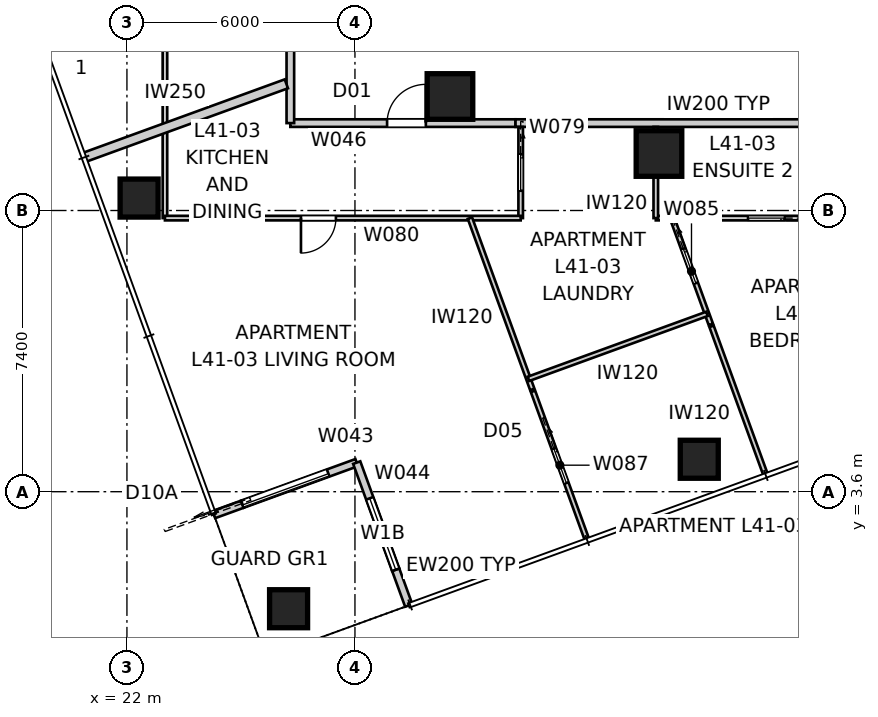
"""IFC4 building model, lengths in metres.
Left out: names, types, materials, properties, quantities, classifications, styles, units other than length and angle.
Written with IfcOpenShell. Run it as: python <this file> out.ifc"""

import sys

from ifc_helpers import new_model, si_unit, direction, frame, frame_2d, origin, origin_2d, place, context, subcontext, project, spatial, rectangle, extrude, element, fill, save


model = new_model("IFC4")
c1 = context("Model", 3, precision=1e-05, world=origin(), true_north=direction((0.0, 1.0)))
c2 = subcontext(c1, "Body", "Model", "MODEL_VIEW")
j1 = project(units=[si_unit("LENGTHUNIT", "METRE"), si_unit("PLANEANGLEUNIT", "RADIAN")], contexts=[c1])
p1 = place(None, origin())
s1 = spatial("IfcSite", under=j1, at=p1, CompositionType="ELEMENT")
p2 = place(p1, origin())
s2 = spatial("IfcBuilding", under=s1, at=p2, CompositionType="ELEMENT")
p3 = place(p2, frame((0.0, 0.0, 150.6)))
s3 = spatial("IfcBuildingStorey", under=s2, at=p3, CompositionType="ELEMENT", Elevation=150.6)
for number, where, z_axis, x_axis in (
    (1, (26.253, 0.521, 0.0), (0.0, 0.0, 1.0), (1.0, 0.0, 0.0)),
    (2, (37.06, 4.454, 0.0), (0.0, 0.0, 1.0), (1.0, 0.0, 0.0)),
    (3, (22.32, 11.327, 0.0), (0.0, 0.0, 1.0), (1.0, 0.0, 0.0)),
):
    element("IfcColumn", number, at=place(p3, frame(where, z_axis=z_axis, x_axis=x_axis)), inside=s3, PredefinedType="COLUMN", context=c2, shape_type="SweptSolid", body=[
        extrude(rectangle(XDim=1.0, YDim=1.0, at=origin_2d()), origin(), (0.0, 0.0, 1.0), 3.4),
    ])
for number, where, z_axis, x_axis in (
    (4, (30.5, 14.0, 0.0), (0.0, 0.0, 1.0), (1.0, 0.0, 0.0)),
    (5, (36.0, 12.5, 0.0), (0.0, 0.0, 1.0), (1.0, 0.0, 0.0)),
):
    element("IfcColumn", number, at=place(p3, frame(where, z_axis=z_axis, x_axis=x_axis)), inside=s3, PredefinedType="COLUMN", context=c2, shape_type="SweptSolid", body=[
        extrude(rectangle(XDim=1.2, YDim=1.2, at=origin_2d()), origin(), (0.0, 0.0, 1.0), 3.4),
    ])
p4 = place(p3, frame((24.288, 2.998, 0.0), z_axis=(0.0, 0.0, 1.0), x_axis=(0.939659694648, 0.342110593602, 0.0)))
e6 = element("IfcWall", 6, at=p4, inside=s3, PredefinedType="SOLIDWALL", context=c2, shape_type="SweptSolid", body=[
    extrude(rectangle(XDim=0.8, YDim=0.2, at=frame_2d((0.4, 0.0))), origin(), (0.0, 0.0, 1.0), 3.25),
])
p5 = place(p3, frame((25.04, 3.271, 0.0), z_axis=(0.0, 0.0, 1.0), x_axis=(0.939693144909, 0.342018703306, 0.0)))
e7 = element("IfcWall", 7, at=p5, inside=s3, PredefinedType="SOLIDWALL", context=c2, shape_type="SweptSolid", body=[
    extrude(rectangle(XDim=3.2, YDim=0.2, at=frame_2d((1.6, 0.0))), origin(), (0.0, 0.0, 1.0), 2.722),
])
p6 = place(p5, origin())
e8 = element("IfcOpeningElement", 8, at=p6, cuts=e7, PredefinedType="OPENING", context=c2, shape_type="SweptSolid", body=[
    extrude(rectangle(XDim=2.4, YDim=2.1, at=frame_2d((1.2, 1.05))), frame((0.0, 0.11, 0.0), z_axis=(0.0, -1.0, 0.0), x_axis=(1.0, 0.0, 0.0)), (0.0, 0.0, 1.0), 0.22),
])
p7 = place(p3, frame((28.047, 4.366, 0.0), z_axis=(0.0, 0.0, 1.0), x_axis=(0.341965219194, -0.939712609717, 0.0)))
e9 = element("IfcWall", 9, at=p7, inside=s3, PredefinedType="SOLIDWALL", context=c2, shape_type="SweptSolid", body=[
    extrude(rectangle(XDim=3.0, YDim=0.2, at=frame_2d((1.5, 0.0))), origin(), (0.0, 0.0, 1.0), 2.722),
])
p8 = place(p7, frame((1.0, 0.0, 0.45)))
e10 = element("IfcOpeningElement", 10, at=p8, cuts=e9, PredefinedType="OPENING", context=c2, shape_type="SweptSolid", body=[
    extrude(rectangle(XDim=2.0, YDim=1.8, at=frame_2d((1.0, 0.9))), frame((0.0, 0.11, 0.0), z_axis=(0.0, -1.0, 0.0), x_axis=(1.0, 0.0, 0.0)), (0.0, 0.0, 1.0), 0.22),
])
p9 = place(p3, frame((29.073, 1.547, 0.0), z_axis=(0.0, 0.0, 1.0), x_axis=(0.342037080957, -0.939686455819, 0.0)))
e11 = element("IfcWall", 11, at=p9, inside=s3, PredefinedType="SOLIDWALL", context=c2, shape_type="SweptSolid", body=[
    extrude(rectangle(XDim=1.0, YDim=0.2, at=frame_2d((0.5, 0.0))), origin(), (0.0, 0.0, 1.0), 3.25),
])
p10 = place(p3, frame((26.3, 13.3, 0.0), z_axis=(0.0, 0.0, 1.0), x_axis=(1.0, 0.0, 0.0)))
e12 = element("IfcWall", 12, at=p10, inside=s3, PredefinedType="PARTITIONING", context=c2, shape_type="SweptSolid", body=[
    extrude(rectangle(XDim=5.925, YDim=0.2, at=frame_2d((2.962, 0.0))), origin(), (0.0, 0.0, 1.0), 3.25),
])
p11 = place(p10, frame((2.545, 0.0, 0.0)))
e13 = element("IfcOpeningElement", 13, at=p11, cuts=e12, PredefinedType="OPENING", context=c2, shape_type="SweptSolid", body=[
    extrude(rectangle(XDim=1.02, YDim=2.34, at=frame_2d((0.51, 1.17))), frame((0.0, 0.11, 0.0), z_axis=(0.0, -1.0, 0.0), x_axis=(1.0, 0.0, 0.0)), (0.0, 0.0, 1.0), 0.22),
])
p12 = place(p3, frame((32.225, 13.3, 0.0), z_axis=(0.0, 0.0, 1.0), x_axis=(1.0, 0.0, 0.0)))
e14 = element("IfcWall", 14, at=p12, inside=s3, PredefinedType="PARTITIONING", context=c2, shape_type="SweptSolid", body=[
    extrude(rectangle(XDim=1.684, YDim=0.2, at=frame_2d((0.842, 0.0))), origin(), (0.0, 0.0, 1.0), 2.55),
])
p13 = place(p3, frame((33.908, 13.3, 0.0), z_axis=(0.0, 0.0, 1.0), x_axis=(1.0, 0.0, 0.0)))
e15 = element("IfcWall", 15, at=p13, inside=s3, PredefinedType="PARTITIONING", context=c2, shape_type="SweptSolid", body=[
    extrude(rectangle(XDim=12.183, YDim=0.2, at=frame_2d((6.092, 0.0))), origin(), (0.0, 0.0, 1.0), 3.25),
])
p14 = place(p3, frame((26.3, 46.3, 0.0), z_axis=(0.0, 0.0, 1.0), x_axis=(0.0, -1.0, 0.0)))
e16 = element("IfcWall", 16, at=p14, inside=s3, PredefinedType="PARTITIONING", context=c2, shape_type="SweptSolid", body=[
    extrude(rectangle(XDim=33.0, YDim=0.2, at=frame_2d((16.5, 0.0))), origin(), (0.0, 0.0, 1.0), 3.25),
])
p15 = place(p14, frame((13.229, 0.0, 0.0)))
e17 = element("IfcOpeningElement", 17, at=p15, cuts=e16, PredefinedType="OPENING", context=c2, shape_type="SweptSolid", body=[
    extrude(rectangle(XDim=1.02, YDim=2.34, at=frame_2d((0.51, 1.17))), frame((0.0, 0.11, 0.0), z_axis=(0.0, -1.0, 0.0), x_axis=(1.0, 0.0, 0.0)), (0.0, 0.0, 1.0), 0.22),
])
p16 = place(p14, frame((28.51, 0.0, 0.0)))
e18 = element("IfcOpeningElement", 18, at=p16, cuts=e16, PredefinedType="OPENING", context=c2, shape_type="SweptSolid", body=[
    extrude(rectangle(XDim=1.02, YDim=2.34, at=frame_2d((0.51, 1.17))), frame((0.0, 0.11, 0.0), z_axis=(0.0, -1.0, 0.0), x_axis=(1.0, 0.0, 0.0)), (0.0, 0.0, 1.0), 0.22),
])
p17 = place(p14, frame((1.998, 0.0, 0.0)))
e19 = element("IfcOpeningElement", 19, at=p17, cuts=e16, PredefinedType="OPENING", context=c2, shape_type="SweptSolid", body=[
    extrude(rectangle(XDim=1.02, YDim=2.34, at=frame_2d((0.51, 1.17))), frame((0.0, 0.11, 0.0), z_axis=(0.0, -1.0, 0.0), x_axis=(1.0, 0.0, 0.0)), (0.0, 0.0, 1.0), 0.22),
])
p18 = place(p3, frame((20.868, 12.395, 0.0), z_axis=(0.0, 0.0, 1.0), x_axis=(0.939690274876, 0.342026588591, 0.0)))
e20 = element("IfcWall", 20, at=p18, inside=s3, PredefinedType="PARTITIONING", context=c2, shape_type="SweptSolid", body=[
    extrude(rectangle(XDim=5.669, YDim=0.25, at=frame_2d((2.834, 0.0))), origin(), (0.0, 0.0, 1.0), 3.25),
])
p19 = place(p3, frame((23.0, 10.8, 0.0), z_axis=(0.0, 0.0, 1.0), x_axis=(0.0, 1.0, 0.0)))
e21 = element("IfcWall", 21, at=p19, inside=s3, PredefinedType="PARTITIONING", context=c2, shape_type="SweptSolid", body=[
    extrude(rectangle(XDim=38.0, YDim=0.12, at=frame_2d((19.0, 0.0))), origin(), (0.0, 0.0, 1.0), 2.55),
])
p20 = place(p19, frame((20.674, 0.0, 0.0)))
e22 = element("IfcOpeningElement", 22, at=p20, cuts=e21, PredefinedType="OPENING", context=c2, shape_type="SweptSolid", body=[
    extrude(rectangle(XDim=0.92, YDim=2.34, at=frame_2d((0.46, 1.17))), frame((0.0, 0.07, 0.0), z_axis=(0.0, -1.0, 0.0), x_axis=(1.0, 0.0, 0.0)), (0.0, 0.0, 1.0), 0.14),
])
p21 = place(p19, frame((4.598, 0.0, 0.0)))
e23 = element("IfcOpeningElement", 23, at=p21, cuts=e21, PredefinedType="OPENING", context=c2, shape_type="SweptSolid", body=[
    extrude(rectangle(XDim=0.92, YDim=2.34, at=frame_2d((0.46, 1.17))), frame((0.0, 0.07, 0.0), z_axis=(0.0, -1.0, 0.0), x_axis=(1.0, 0.0, 0.0)), (0.0, 0.0, 1.0), 0.14),
])
p22 = place(p19, frame((8.043, 0.0, 0.0)))
e24 = element("IfcOpeningElement", 24, at=p22, cuts=e21, PredefinedType="OPENING", context=c2, shape_type="SweptSolid", body=[
    extrude(rectangle(XDim=0.92, YDim=2.34, at=frame_2d((0.46, 1.17))), frame((0.0, 0.07, 0.0), z_axis=(0.0, -1.0, 0.0), x_axis=(1.0, 0.0, 0.0)), (0.0, 0.0, 1.0), 0.14),
])
p23 = place(p19, frame((33.957, 0.0, 0.0)))
e25 = element("IfcOpeningElement", 25, at=p23, cuts=e21, PredefinedType="OPENING", context=c2, shape_type="SweptSolid", body=[
    extrude(rectangle(XDim=0.92, YDim=2.34, at=frame_2d((0.46, 1.17))), frame((0.0, 0.07, 0.0), z_axis=(0.0, -1.0, 0.0), x_axis=(1.0, 0.0, 0.0)), (0.0, 0.0, 1.0), 0.14),
])
p24 = place(p19, frame((26.957, 0.0, 0.0)))
e26 = element("IfcOpeningElement", 26, at=p24, cuts=e21, PredefinedType="OPENING", context=c2, shape_type="SweptSolid", body=[
    extrude(rectangle(XDim=0.96, YDim=2.1, at=frame_2d((0.48, 1.05))), frame((0.0, 0.07, 0.0), z_axis=(0.0, -1.0, 0.0), x_axis=(1.0, 0.0, 0.0)), (0.0, 0.0, 1.0), 0.14),
])
p25 = place(p3, frame((32.361, 13.2, 0.0), z_axis=(0.0, 0.0, 1.0), x_axis=(0.0, -1.0, 0.0)))
e27 = element("IfcWall", 27, at=p25, inside=s3, PredefinedType="PARTITIONING", context=c2, shape_type="SweptSolid", body=[
    extrude(rectangle(XDim=2.4, YDim=0.12, at=frame_2d((1.2, 0.0))), origin(), (0.0, 0.0, 1.0), 3.25),
])
p26 = place(p25, frame((0.72, 0.0, 0.0)))
e28 = element("IfcOpeningElement", 28, at=p26, cuts=e27, PredefinedType="OPENING", context=c2, shape_type="SweptSolid", body=[
    extrude(rectangle(XDim=0.96, YDim=2.1, at=frame_2d((0.48, 1.05))), frame((0.0, 0.07, 0.0), z_axis=(0.0, -1.0, 0.0), x_axis=(1.0, 0.0, 0.0)), (0.0, 0.0, 1.0), 0.14),
])
p27 = place(p3, frame((32.361, 10.8, 0.0), z_axis=(0.0, 0.0, 1.0), x_axis=(-1.0, 0.0, 0.0)))
e29 = element("IfcWall", 29, at=p27, inside=s3, PredefinedType="PARTITIONING", context=c2, shape_type="SweptSolid", body=[
    extrude(rectangle(XDim=9.361, YDim=0.12, at=frame_2d((4.681, 0.0))), origin(), (0.0, 0.0, 1.0), 3.25),
])
p28 = place(p27, frame((4.862, 0.0, 0.0)))
e30 = element("IfcOpeningElement", 30, at=p28, cuts=e29, PredefinedType="OPENING", context=c2, shape_type="SweptSolid", body=[
    extrude(rectangle(XDim=0.92, YDim=2.34, at=frame_2d((0.46, 1.17))), frame((0.0, 0.07, 0.0), z_axis=(0.0, -1.0, 0.0), x_axis=(1.0, 0.0, 0.0)), (0.0, 0.0, 1.0), 0.14),
])
p29 = place(p3, frame((53.8, 10.8, 0.0), z_axis=(0.0, 0.0, 1.0), x_axis=(-1.0, 0.0, 0.0)))
e31 = element("IfcWall", 31, at=p29, inside=s3, PredefinedType="PARTITIONING", context=c2, shape_type="SweptSolid", body=[
    extrude(rectangle(XDim=17.884, YDim=0.12, at=frame_2d((8.942, 0.0))), origin(), (0.0, 0.0, 1.0), 3.25),
])
p30 = place(p29, frame((3.665, 0.0, 0.0)))
e32 = element("IfcOpeningElement", 32, at=p30, cuts=e31, PredefinedType="OPENING", context=c2, shape_type="SweptSolid", body=[
    extrude(rectangle(XDim=0.92, YDim=2.34, at=frame_2d((0.46, 1.17))), frame((0.0, 0.07, 0.0), z_axis=(0.0, -1.0, 0.0), x_axis=(1.0, 0.0, 0.0)), (0.0, 0.0, 1.0), 0.14),
])
p31 = place(p29, frame((14.497, 0.0, 0.0)))
e33 = element("IfcOpeningElement", 33, at=p31, cuts=e31, PredefinedType="OPENING", context=c2, shape_type="SweptSolid", body=[
    extrude(rectangle(XDim=0.96, YDim=2.1, at=frame_2d((0.48, 1.05))), frame((0.0, 0.07, 0.0), z_axis=(0.0, -1.0, 0.0), x_axis=(1.0, 0.0, 0.0)), (0.0, 0.0, 1.0), 0.14),
])
p32 = place(p3, frame((35.916, 10.8, 0.0), z_axis=(0.0, 0.0, 1.0), x_axis=(0.0, 1.0, 0.0)))
e34 = element("IfcWall", 34, at=p32, inside=s3, PredefinedType="PARTITIONING", context=c2, shape_type="SweptSolid", body=[
    extrude(rectangle(XDim=2.4, YDim=0.12, at=frame_2d((1.2, 0.0))), origin(), (0.0, 0.0, 1.0), 3.25),
])
p33 = place(p3, frame((32.666, 6.292, 0.0), z_axis=(0.0, 0.0, 1.0), x_axis=(-0.341988220281, 0.93970423921, 0.0)))
e35 = element("IfcWall", 35, at=p33, inside=s3, PredefinedType="PARTITIONING", context=c2, shape_type="SweptSolid", body=[
    extrude(rectangle(XDim=4.797, YDim=0.12, at=frame_2d((2.399, 0.0))), origin(), (0.0, 0.0, 1.0), 3.25),
])
p34 = place(p3, frame((36.346, 10.8, 0.0), z_axis=(0.0, 0.0, 1.0), x_axis=(0.341986632257, -0.939704817141, 0.0)))
e36 = element("IfcWall", 36, at=p34, inside=s3, PredefinedType="PARTITIONING", context=c2, shape_type="SweptSolid", body=[
    extrude(rectangle(XDim=2.978, YDim=0.12, at=frame_2d((1.489, 0.0))), origin(), (0.0, 0.0, 1.0), 3.25),
])
p35 = place(p34, frame((0.861, 0.0, 0.0)))
e37 = element("IfcOpeningElement", 37, at=p35, cuts=e36, PredefinedType="OPENING", context=c2, shape_type="SweptSolid", body=[
    extrude(rectangle(XDim=0.96, YDim=2.1, at=frame_2d((0.48, 1.05))), frame((0.0, 0.07, 0.0), z_axis=(0.0, -1.0, 0.0), x_axis=(1.0, 0.0, 0.0)), (0.0, 0.0, 1.0), 0.14),
])
p36 = place(p3, frame((37.264, 8.28, 0.0), z_axis=(0.0, 0.0, 1.0), x_axis=(-0.939686455819, -0.342037080957, 0.0)))
e38 = element("IfcWall", 38, at=p36, inside=s3, PredefinedType="PARTITIONING", context=c2, shape_type="SweptSolid", body=[
    extrude(rectangle(XDim=5.0, YDim=0.12, at=frame_2d((2.5, 0.0))), origin(), (0.0, 0.0, 1.0), 3.25),
])
p37 = place(p3, frame((32.685, 6.241, 0.0), z_axis=(0.0, 0.0, 1.0), x_axis=(0.342036918442, -0.939686514973, 0.0)))
e39 = element("IfcWall", 39, at=p37, inside=s3, PredefinedType="PARTITIONING", context=c2, shape_type="SweptSolid", body=[
    extrude(rectangle(XDim=4.136, YDim=0.12, at=frame_2d((2.068, 0.0))), origin(), (0.0, 0.0, 1.0), 3.25),
])
p38 = place(p37, frame((1.608, 0.0, 0.0)))
e40 = element("IfcOpeningElement", 40, at=p38, cuts=e39, PredefinedType="OPENING", context=c2, shape_type="SweptSolid", body=[
    extrude(rectangle(XDim=0.96, YDim=2.1, at=frame_2d((0.48, 1.05))), frame((0.0, 0.07, 0.0), z_axis=(0.0, -1.0, 0.0), x_axis=(1.0, 0.0, 0.0)), (0.0, 0.0, 1.0), 0.14),
])
p39 = place(p3, frame((38.798, 4.065, 0.0), z_axis=(0.0, 0.0, 1.0), x_axis=(-0.342036918442, 0.939686514973, 0.0)))
e41 = element("IfcWall", 41, at=p39, inside=s3, PredefinedType="PARTITIONING", context=c2, shape_type="SweptSolid", body=[
    extrude(rectangle(XDim=4.136, YDim=0.12, at=frame_2d((2.068, 0.0))), origin(), (0.0, 0.0, 1.0), 3.25),
])
p40 = place(p6, origin())
e42 = element("IfcDoor", 42, at=p40, inside=s3, OperationType="SLIDING_TO_LEFT", PredefinedType="DOOR", context=c2, shape_type="SweptSolid", body=[
    extrude(rectangle(XDim=2.4, YDim=2.1, at=frame_2d((1.2, 1.05))), frame((0.0, 0.025, 0.0), z_axis=(0.0, -1.0, 0.0), x_axis=(1.0, 0.0, 0.0)), (0.0, 0.0, 1.0), 0.05),
])
fill(e8, e42)
p41 = place(p8, origin())
e43 = element("IfcWindow", 43, at=p41, inside=s3, PartitioningType="SINGLE_PANEL", PredefinedType="WINDOW", context=c2, shape_type="SweptSolid", body=[
    extrude(rectangle(XDim=2.0, YDim=1.8, at=frame_2d((1.0, 0.9))), frame((0.0, 0.03, 0.0), z_axis=(0.0, -1.0, 0.0), x_axis=(1.0, 0.0, 0.0)), (0.0, 0.0, 1.0), 0.06),
])
fill(e10, e43)
p42 = place(p11, origin())
e44 = element("IfcDoor", 44, at=p42, inside=s3, OperationType="SINGLE_SWING_RIGHT", PredefinedType="DOOR", context=c2, shape_type="SweptSolid", body=[
    extrude(rectangle(XDim=1.02, YDim=2.34, at=frame_2d((0.51, 1.17))), frame((0.0, 0.025, 0.0), z_axis=(0.0, -1.0, 0.0), x_axis=(1.0, 0.0, 0.0)), (0.0, 0.0, 1.0), 0.05),
])
fill(e13, e44)
p43 = place(p28, origin())
e45 = element("IfcDoor", 45, at=p43, inside=s3, OperationType="SINGLE_SWING_RIGHT", PredefinedType="DOOR", context=c2, shape_type="SweptSolid", body=[
    extrude(rectangle(XDim=0.92, YDim=2.34, at=frame_2d((0.46, 1.17))), frame((0.0, 0.025, 0.0), z_axis=(0.0, -1.0, 0.0), x_axis=(1.0, 0.0, 0.0)), (0.0, 0.0, 1.0), 0.05),
])
fill(e30, e45)
p44 = place(p26, origin())
e46 = element("IfcDoor", 46, at=p44, inside=s3, OperationType="SLIDING_TO_LEFT", PredefinedType="DOOR", context=c2, shape_type="SweptSolid", body=[
    extrude(rectangle(XDim=0.96, YDim=2.1, at=frame_2d((0.48, 1.05))), frame((0.0, 0.025, 0.0), z_axis=(0.0, -1.0, 0.0), x_axis=(1.0, 0.0, 0.0)), (0.0, 0.0, 1.0), 0.05),
])
fill(e28, e46)
p45 = place(p38, origin())
e47 = element("IfcDoor", 47, at=p45, inside=s3, OperationType="SLIDING_TO_LEFT", PredefinedType="DOOR", context=c2, shape_type="SweptSolid", body=[
    extrude(rectangle(XDim=0.96, YDim=2.1, at=frame_2d((0.48, 1.05))), frame((0.0, 0.025, 0.0), z_axis=(0.0, -1.0, 0.0), x_axis=(1.0, 0.0, 0.0)), (0.0, 0.0, 1.0), 0.05),
])
fill(e40, e47)
p46 = place(p35, origin())
e48 = element("IfcDoor", 48, at=p46, inside=s3, OperationType="SLIDING_TO_LEFT", PredefinedType="DOOR", context=c2, shape_type="SweptSolid", body=[
    extrude(rectangle(XDim=0.96, YDim=2.1, at=frame_2d((0.48, 1.05))), frame((0.0, 0.025, 0.0), z_axis=(0.0, -1.0, 0.0), x_axis=(1.0, 0.0, 0.0)), (0.0, 0.0, 1.0), 0.05),
])
fill(e37, e48)
p47 = place(p31, origin())
e49 = element("IfcDoor", 49, at=p47, inside=s3, OperationType="SLIDING_TO_LEFT", PredefinedType="DOOR", context=c2, shape_type="SweptSolid", body=[
    extrude(rectangle(XDim=0.96, YDim=2.1, at=frame_2d((0.48, 1.05))), frame((0.0, 0.025, 0.0), z_axis=(0.0, -1.0, 0.0), x_axis=(1.0, 0.0, 0.0)), (0.0, 0.0, 1.0), 0.05),
])
fill(e33, e49)
save(model, sys.argv[1])
